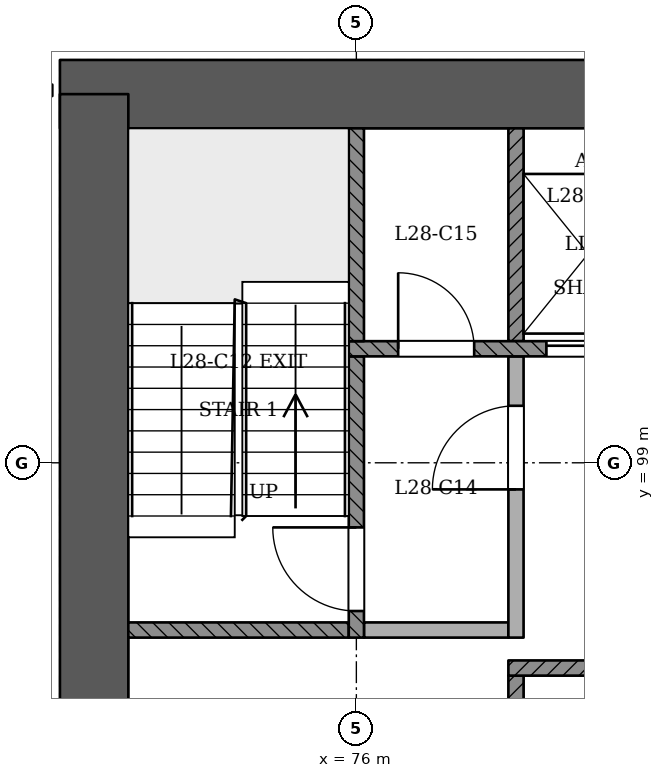
"""IFC4 building model, lengths in metres.
Left out: names, types, materials, properties, quantities, classifications, styles, units other than length and angle.
Written with IfcOpenShell. Run it as: python <this file> out.ifc"""

import sys

from ifc_helpers import new_model, si_unit, direction, frame, frame_2d, origin, place, context, subcontext, project, spatial, rectangle, extrude, element, fill, save


model = new_model("IFC4")
c1 = context("Model", 3, precision=1e-05, world=origin(), true_north=direction((0.0, 1.0)))
c2 = subcontext(c1, "Body", "Model", "MODEL_VIEW")
j1 = project(units=[si_unit("LENGTHUNIT", "METRE"), si_unit("PLANEANGLEUNIT", "RADIAN")], contexts=[c1])
p1 = place(None, origin())
s1 = spatial("IfcSite", under=j1, at=p1, CompositionType="ELEMENT")
p2 = place(p1, origin())
s2 = spatial("IfcBuilding", under=s1, at=p2, CompositionType="ELEMENT")
p3 = place(p2, frame((0.0, 0.0, 111.6)))
s3 = spatial("IfcBuildingStorey", under=s2, at=p3, CompositionType="ELEMENT", Elevation=111.6)
p4 = place(p3, frame((97.45, 103.85, 0.0), z_axis=(0.0, 0.0, 1.0), x_axis=(-1.0, 0.0, 0.0)))
e1 = element("IfcWall", 1, at=p4, inside=s3, PredefinedType="SHEAR", context=c2, shape_type="SweptSolid", body=[
    extrude(rectangle(XDim=25.35, YDim=0.9, at=frame_2d((12.675, 0.0))), origin(), (0.0, 0.0, 1.0), 3.6),
])
p5 = place(p3, frame((72.55, 103.85, 0.0), z_axis=(0.0, 0.0, 1.0), x_axis=(0.0, -1.0, 0.0)))
e2 = element("IfcWall", 2, at=p5, inside=s3, PredefinedType="SHEAR", context=c2, shape_type="SweptSolid", body=[
    extrude(rectangle(XDim=11.35, YDim=0.9, at=frame_2d((5.675, 0.0))), origin(), (0.0, 0.0, 1.0), 3.6),
])
p6 = place(p3, frame((63.988, 97.906, 0.0), z_axis=(0.0, 0.0, 1.0), x_axis=(0.500001579174, -0.866024492046, 0.0)))
e3 = element("IfcWall", 3, at=p6, inside=s3, PredefinedType="PARTITIONING", context=c2, shape_type="SweptSolid", body=[
    extrude(rectangle(XDim=41.339, YDim=0.15, at=frame_2d((20.669, 0.0))), origin(), (0.0, 0.0, 1.0), 2.7),
])
p7 = place(p6, frame((0.228, 0.0, 0.0)))
e4 = element("IfcOpeningElement", 4, at=p7, cuts=e3, PredefinedType="OPENING", context=c2, shape_type="SweptSolid", body=[
    extrude(rectangle(XDim=1.2, YDim=2.1, at=frame_2d((0.6, 1.05))), frame((0.0, 0.085, 0.0), z_axis=(0.0, -1.0, 0.0), x_axis=(1.0, 0.0, 0.0)), (0.0, 0.0, 1.0), 0.171),
])
p8 = place(p6, frame((11.07, 0.0, 0.0)))
e5 = element("IfcOpeningElement", 5, at=p8, cuts=e3, PredefinedType="OPENING", context=c2, shape_type="SweptSolid", body=[
    extrude(rectangle(XDim=1.2, YDim=2.1, at=frame_2d((0.6, 1.05))), frame((0.0, 0.085, 0.0), z_axis=(0.0, -1.0, 0.0), x_axis=(1.0, 0.0, 0.0)), (0.0, 0.0, 1.0), 0.171),
])
p9 = place(p6, frame((22.32, 0.0, 0.0)))
e6 = element("IfcOpeningElement", 6, at=p9, cuts=e3, PredefinedType="OPENING", context=c2, shape_type="SweptSolid", body=[
    extrude(rectangle(XDim=1.2, YDim=2.1, at=frame_2d((0.6, 1.05))), frame((0.0, 0.085, 0.0), z_axis=(0.0, -1.0, 0.0), x_axis=(1.0, 0.0, 0.0)), (0.0, 0.0, 1.0), 0.171),
])
p10 = place(p6, frame((32.47, 0.0, 0.0)))
e7 = element("IfcOpeningElement", 7, at=p10, cuts=e3, PredefinedType="OPENING", context=c2, shape_type="SweptSolid", body=[
    extrude(rectangle(XDim=1.2, YDim=2.1, at=frame_2d((0.6, 1.05))), frame((0.0, 0.085, 0.0), z_axis=(0.0, -1.0, 0.0), x_axis=(1.0, 0.0, 0.0)), (0.0, 0.0, 1.0), 0.171),
])
p11 = place(p6, frame((39.758, 0.0, 0.0)))
e8 = element("IfcOpeningElement", 8, at=p11, cuts=e3, PredefinedType="OPENING", context=c2, shape_type="SweptSolid", body=[
    extrude(rectangle(XDim=1.0, YDim=2.1, at=frame_2d((0.5, 1.05))), frame((0.0, 0.085, 0.0), z_axis=(0.0, -1.0, 0.0), x_axis=(1.0, 0.0, 0.0)), (0.0, 0.0, 1.0), 0.171),
])
p12 = place(p3, frame((78.1, 93.4, 0.0), z_axis=(0.0, 0.0, 1.0), x_axis=(0.0, 1.0, 0.0)))
e9 = element("IfcWall", 9, at=p12, inside=s3, PredefinedType="SOLIDWALL", context=c2, shape_type="SweptSolid", body=[
    extrude(rectangle(XDim=2.8, YDim=0.2, at=frame_2d((1.4, 0.0))), origin(), (0.0, 0.0, 1.0), 3.1),
])
p13 = place(p3, frame((78.0, 96.3, 0.0), z_axis=(0.0, 0.0, 1.0), x_axis=(1.0, 0.0, 0.0)))
e10 = element("IfcWall", 10, at=p13, inside=s3, PredefinedType="SOLIDWALL", context=c2, shape_type="SweptSolid", body=[
    extrude(rectangle(XDim=7.8, YDim=0.2, at=frame_2d((3.9, 0.0))), origin(), (0.0, 0.0, 1.0), 3.1),
])
p14 = place(p3, frame((73.0, 96.8, 0.0), z_axis=(0.0, 0.0, 1.0), x_axis=(1.0, 0.0, 0.0)))
e11 = element("IfcWall", 11, at=p14, inside=s3, PredefinedType="SOLIDWALL", context=c2, shape_type="SweptSolid", body=[
    extrude(rectangle(XDim=2.9, YDim=0.2, at=frame_2d((1.45, 0.0))), origin(), (0.0, 0.0, 1.0), 3.1),
])
p15 = place(p3, frame((76.0, 96.7, 0.0), z_axis=(0.0, 0.0, 1.0), x_axis=(0.0, 1.0, 0.0)))
e12 = element("IfcWall", 12, at=p15, inside=s3, PredefinedType="SOLIDWALL", context=c2, shape_type="SweptSolid", body=[
    extrude(rectangle(XDim=3.7, YDim=0.2, at=frame_2d((1.85, 0.0))), origin(), (0.0, 0.0, 1.0), 3.1),
])
p16 = place(p15, frame((0.35, 0.0, 0.0)))
e13 = element("IfcOpeningElement", 13, at=p16, cuts=e12, PredefinedType="OPENING", context=c2, shape_type="SweptSolid", body=[
    extrude(rectangle(XDim=1.1, YDim=2.1, at=frame_2d((0.55, 1.05))), frame((0.0, 0.11, 0.0), z_axis=(0.0, -1.0, 0.0), x_axis=(1.0, 0.0, 0.0)), (0.0, 0.0, 1.0), 0.221),
])
p17 = place(p3, frame((76.1, 96.8, 0.0), z_axis=(0.0, 0.0, 1.0), x_axis=(1.0, 0.0, 0.0)))
e14 = element("IfcWall", 14, at=p17, inside=s3, PredefinedType="PARTITIONING", context=c2, shape_type="SweptSolid", body=[
    extrude(rectangle(XDim=1.9, YDim=0.2, at=frame_2d((0.95, 0.0))), origin(), (0.0, 0.0, 1.0), 3.1),
])
p18 = place(p3, frame((78.1, 96.7, 0.0), z_axis=(0.0, 0.0, 1.0), x_axis=(0.0, 1.0, 0.0)))
e15 = element("IfcWall", 15, at=p18, inside=s3, PredefinedType="PARTITIONING", context=c2, shape_type="SweptSolid", body=[
    extrude(rectangle(XDim=3.7, YDim=0.2, at=frame_2d((1.85, 0.0))), origin(), (0.0, 0.0, 1.0), 3.1),
])
p19 = place(p18, frame((1.95, 0.0, 0.0)))
e16 = element("IfcOpeningElement", 16, at=p19, cuts=e15, PredefinedType="OPENING", context=c2, shape_type="SweptSolid", body=[
    extrude(rectangle(XDim=1.1, YDim=2.1, at=frame_2d((0.55, 1.05))), frame((0.0, 0.11, 0.0), z_axis=(0.0, -1.0, 0.0), x_axis=(1.0, 0.0, 0.0)), (0.0, 0.0, 1.0), 0.221),
])
p20 = place(p3, frame((75.9, 100.5, 0.0), z_axis=(0.0, 0.0, 1.0), x_axis=(1.0, 0.0, 0.0)))
e17 = element("IfcWall", 17, at=p20, inside=s3, PredefinedType="SOLIDWALL", context=c2, shape_type="SweptSolid", body=[
    extrude(rectangle(XDim=18.2, YDim=0.2, at=frame_2d((9.1, 0.0))), origin(), (0.0, 0.0, 1.0), 3.1),
])
p21 = place(p20, frame((2.6, 0.0, 0.0)))
e18 = element("IfcOpeningElement", 18, at=p21, cuts=e17, PredefinedType="OPENING", context=c2, shape_type="SweptSolid", body=[
    extrude(rectangle(XDim=1.1, YDim=2.1, at=frame_2d((0.55, 1.05))), frame((0.0, 0.11, 0.0), z_axis=(0.0, -1.0, 0.0), x_axis=(1.0, 0.0, 0.0)), (0.0, 0.0, 1.0), 0.221),
])
p22 = place(p20, frame((4.5, 0.0, 0.0)))
e19 = element("IfcOpeningElement", 19, at=p22, cuts=e17, PredefinedType="OPENING", context=c2, shape_type="SweptSolid", body=[
    extrude(rectangle(XDim=1.1, YDim=2.1, at=frame_2d((0.55, 1.05))), frame((0.0, 0.11, 0.0), z_axis=(0.0, -1.0, 0.0), x_axis=(1.0, 0.0, 0.0)), (0.0, 0.0, 1.0), 0.221),
])
p23 = place(p20, frame((6.4, 0.0, 0.0)))
e20 = element("IfcOpeningElement", 20, at=p23, cuts=e17, PredefinedType="OPENING", context=c2, shape_type="SweptSolid", body=[
    extrude(rectangle(XDim=1.1, YDim=2.1, at=frame_2d((0.55, 1.05))), frame((0.0, 0.11, 0.0), z_axis=(0.0, -1.0, 0.0), x_axis=(1.0, 0.0, 0.0)), (0.0, 0.0, 1.0), 0.221),
])
p24 = place(p20, frame((8.3, 0.0, 0.0)))
e21 = element("IfcOpeningElement", 21, at=p24, cuts=e17, PredefinedType="OPENING", context=c2, shape_type="SweptSolid", body=[
    extrude(rectangle(XDim=1.1, YDim=2.1, at=frame_2d((0.55, 1.05))), frame((0.0, 0.11, 0.0), z_axis=(0.0, -1.0, 0.0), x_axis=(1.0, 0.0, 0.0)), (0.0, 0.0, 1.0), 0.221),
])
p25 = place(p20, frame((10.2, 0.0, 0.0)))
e22 = element("IfcOpeningElement", 22, at=p25, cuts=e17, PredefinedType="OPENING", context=c2, shape_type="SweptSolid", body=[
    extrude(rectangle(XDim=1.1, YDim=2.1, at=frame_2d((0.55, 1.05))), frame((0.0, 0.11, 0.0), z_axis=(0.0, -1.0, 0.0), x_axis=(1.0, 0.0, 0.0)), (0.0, 0.0, 1.0), 0.221),
])
p26 = place(p20, frame((12.1, 0.0, 0.0)))
e23 = element("IfcOpeningElement", 23, at=p26, cuts=e17, PredefinedType="OPENING", context=c2, shape_type="SweptSolid", body=[
    extrude(rectangle(XDim=1.1, YDim=2.1, at=frame_2d((0.55, 1.05))), frame((0.0, 0.11, 0.0), z_axis=(0.0, -1.0, 0.0), x_axis=(1.0, 0.0, 0.0)), (0.0, 0.0, 1.0), 0.221),
])
p27 = place(p20, frame((14.0, 0.0, 0.0)))
e24 = element("IfcOpeningElement", 24, at=p27, cuts=e17, PredefinedType="OPENING", context=c2, shape_type="SweptSolid", body=[
    extrude(rectangle(XDim=1.1, YDim=2.1, at=frame_2d((0.55, 1.05))), frame((0.0, 0.11, 0.0), z_axis=(0.0, -1.0, 0.0), x_axis=(1.0, 0.0, 0.0)), (0.0, 0.0, 1.0), 0.221),
])
p28 = place(p20, frame((0.65, 0.0, 0.0)))
e25 = element("IfcOpeningElement", 25, at=p28, cuts=e17, PredefinedType="OPENING", context=c2, shape_type="SweptSolid", body=[
    extrude(rectangle(XDim=1.0, YDim=2.1, at=frame_2d((0.5, 1.05))), frame((0.0, 0.11, 0.0), z_axis=(0.0, -1.0, 0.0), x_axis=(1.0, 0.0, 0.0)), (0.0, 0.0, 1.0), 0.221),
])
p29 = place(p20, frame((16.3, 0.0, 0.0)))
e26 = element("IfcOpeningElement", 26, at=p29, cuts=e17, PredefinedType="OPENING", context=c2, shape_type="SweptSolid", body=[
    extrude(rectangle(XDim=1.0, YDim=2.1, at=frame_2d((0.5, 1.05))), frame((0.0, 0.11, 0.0), z_axis=(0.0, -1.0, 0.0), x_axis=(1.0, 0.0, 0.0)), (0.0, 0.0, 1.0), 0.221),
])
for number, where, z_axis, x_axis in (
    (27, (76.0, 100.6, 0.0), (0.0, 0.0, 1.0), (0.0, 1.0, 0.0)),
    (28, (78.1, 100.6, 0.0), (0.0, 0.0, 1.0), (0.0, 1.0, 0.0)),
):
    element("IfcWall", number, at=place(p3, frame(where, z_axis=z_axis, x_axis=x_axis)), inside=s3, PredefinedType="SOLIDWALL", context=c2, shape_type="SweptSolid", body=[
        extrude(rectangle(XDim=2.8, YDim=0.2, at=frame_2d((1.4, 0.0))), origin(), (0.0, 0.0, 1.0), 3.1),
    ])
p30 = place(p21, origin())
e29 = element("IfcDoor", 29, at=p30, inside=s3, OperationType="SLIDING_TO_RIGHT", PredefinedType="NOTDEFINED", context=c2, shape_type="SweptSolid", body=[
    extrude(rectangle(XDim=1.1, YDim=2.1, at=frame_2d((0.55, 1.05))), frame((0.0, 0.025, 0.0), z_axis=(0.0, -1.0, 0.0), x_axis=(1.0, 0.0, 0.0)), (0.0, 0.0, 1.0), 0.05),
])
fill(e18, e29)
p31 = place(p16, origin())
e30 = element("IfcDoor", 30, at=p31, inside=s3, OperationType="SINGLE_SWING_RIGHT", PredefinedType="NOTDEFINED", context=c2, shape_type="SweptSolid", body=[
    extrude(rectangle(XDim=1.1, YDim=2.1, at=frame_2d((0.55, 1.05))), frame((0.0, 0.025, 0.0), z_axis=(0.0, -1.0, 0.0), x_axis=(1.0, 0.0, 0.0)), (0.0, 0.0, 1.0), 0.05),
])
fill(e13, e30)
p32 = place(p19, origin())
e31 = element("IfcDoor", 31, at=p32, inside=s3, OperationType="SINGLE_SWING_LEFT", PredefinedType="NOTDEFINED", context=c2, shape_type="SweptSolid", body=[
    extrude(rectangle(XDim=1.1, YDim=2.1, at=frame_2d((0.55, 1.05))), frame((0.0, 0.025, 0.0), z_axis=(0.0, -1.0, 0.0), x_axis=(1.0, 0.0, 0.0)), (0.0, 0.0, 1.0), 0.05),
])
fill(e16, e31)
p33 = place(p28, origin())
e32 = element("IfcDoor", 32, at=p33, inside=s3, OperationType="SINGLE_SWING_LEFT", PredefinedType="NOTDEFINED", context=c2, shape_type="SweptSolid", body=[
    extrude(rectangle(XDim=1.0, YDim=2.1, at=frame_2d((0.5, 1.05))), frame((0.0, 0.025, 0.0), z_axis=(0.0, -1.0, 0.0), x_axis=(1.0, 0.0, 0.0)), (0.0, 0.0, 1.0), 0.05),
])
fill(e25, e32)
save(model, sys.argv[1])
